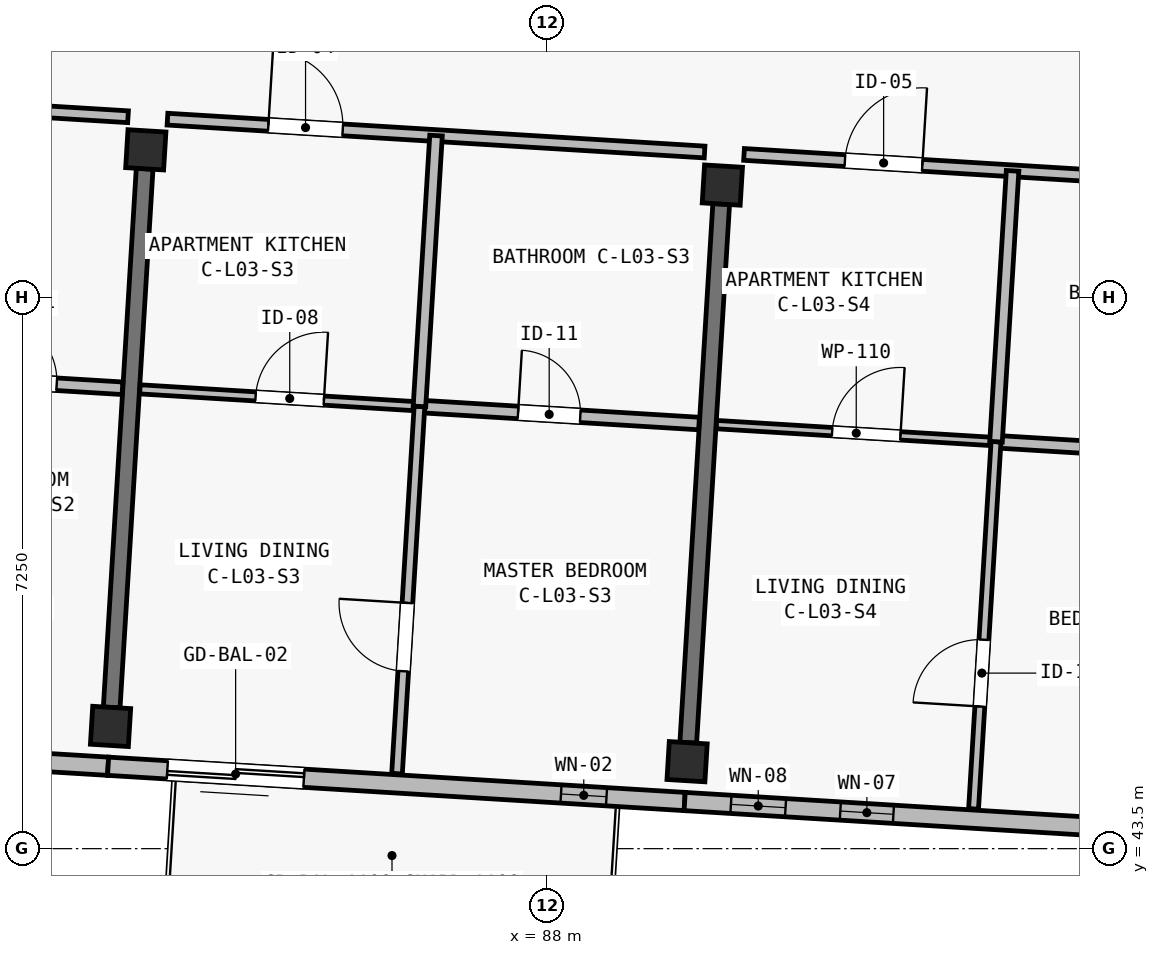
"""IFC4 building model, lengths in metres.
Left out: names, types, materials, properties, quantities, classifications, styles, units other than length and angle.
Written with IfcOpenShell. Run it as: python <this file> out.ifc"""

import sys

from ifc_helpers import new_model, si_unit, direction, frame, frame_2d, origin, origin_2d, place, context, subcontext, project, spatial, rectangle, extrude, element, fill, save


model = new_model("IFC4")
c1 = context("Model", 3, precision=1e-05, world=origin(), true_north=direction((0.0, 1.0)))
c2 = subcontext(c1, "Body", "Model", "MODEL_VIEW")
j1 = project(units=[si_unit("LENGTHUNIT", "METRE"), si_unit("PLANEANGLEUNIT", "RADIAN")], contexts=[c1])
p1 = place(None, origin())
s1 = spatial("IfcSite", under=j1, at=p1, CompositionType="ELEMENT")
p2 = place(p1, origin())
s2 = spatial("IfcBuilding", under=s1, at=p2, CompositionType="ELEMENT")
p3 = place(p2, frame((0.0, 0.0, 11.65)))
s3 = spatial("IfcBuildingStorey", under=s2, at=p3, CompositionType="ELEMENT", Elevation=11.65)
for number, where, z_axis, x_axis in (
    (1, (82.258, 45.108, 0.0), (0.0, 0.0, 1.0), (0.998, -0.061, 0.0)),
    (2, (82.721, 52.694, 0.0), (0.0, 0.0, 1.0), (0.998, -0.061, 0.0)),
    (3, (89.843, 44.644, 0.0), (0.0, 0.0, 1.0), (0.998, -0.061, 0.0)),
    (4, (90.307, 52.23, 0.0), (0.0, 0.0, 1.0), (0.998, -0.061, 0.0)),
):
    element("IfcColumn", number, at=place(p3, frame(where, z_axis=z_axis, x_axis=x_axis)), inside=s3, PredefinedType="COLUMN", context=c2, shape_type="SweptSolid", body=[
        extrude(rectangle(XDim=0.5, YDim=0.5, at=origin_2d()), origin(), (0.0, 0.0, 1.0), 3.25),
    ])
p4 = place(p3, frame((82.273, 45.358, 0.0), z_axis=(0.0, 0.0, 1.0), x_axis=(0.061070212127, 0.998133472633, 0.0)))
e5 = element("IfcWall", 5, at=p4, inside=s3, PredefinedType="SHEAR", context=c2, shape_type="SweptSolid", body=[
    extrude(rectangle(XDim=7.1, YDim=0.22, at=frame_2d((3.55, 0.0))), origin(), (0.0, 0.0, 1.0), 2.5),
])
p5 = place(p3, frame((89.859, 44.894, 0.0), z_axis=(0.0, 0.0, 1.0), x_axis=(0.061033859059, 0.99813569621, 0.0)))
e6 = element("IfcWall", 6, at=p5, inside=s3, PredefinedType="SHEAR", context=c2, shape_type="SweptSolid", body=[
    extrude(rectangle(XDim=7.1, YDim=0.22, at=frame_2d((3.55, 0.0))), origin(), (0.0, 0.0, 1.0), 2.5),
])
p6 = place(p3, frame((82.225, 44.584, 0.0), z_axis=(0.0, 0.0, 1.0), x_axis=(-0.998133591969, 0.061068261669, 0.0)))
e7 = element("IfcWall", 7, at=p6, inside=s3, PredefinedType="SOLIDWALL", context=c2, shape_type="SweptSolid", body=[
    extrude(rectangle(XDim=7.6, YDim=0.24, at=frame_2d((3.8, 0.0))), origin(), (0.0, 0.0, 1.0), 3.0),
])
p7 = place(p6, frame((0.845, 0.0, 0.52)))
e8 = element("IfcOpeningElement", 8, at=p7, cuts=e7, PredefinedType="OPENING", context=c2, shape_type="SweptSolid", body=[
    extrude(rectangle(XDim=0.74, YDim=2.26, at=frame_2d((0.37, 1.13))), frame((0.0, 0.135, 0.0), z_axis=(0.0, -1.0, 0.0), x_axis=(1.0, 0.0, 0.0)), (0.0, 0.0, 1.0), 0.27),
])
p8 = place(p6, frame((3.24, 0.0, 0.52)))
e9 = element("IfcOpeningElement", 9, at=p8, cuts=e7, PredefinedType="OPENING", context=c2, shape_type="SweptSolid", body=[
    extrude(rectangle(XDim=0.8, YDim=2.3, at=frame_2d((0.4, 1.15))), frame((0.0, 0.135, 0.0), z_axis=(0.0, -1.0, 0.0), x_axis=(1.0, 0.0, 0.0)), (0.0, 0.0, 1.0), 0.27),
])
p9 = place(p3, frame((89.811, 44.12, 0.0), z_axis=(0.0, 0.0, 1.0), x_axis=(-0.998135669243, 0.061034300063, 0.0)))
e10 = element("IfcWall", 10, at=p9, inside=s3, PredefinedType="SOLIDWALL", context=c2, shape_type="SweptSolid", body=[
    extrude(rectangle(XDim=7.6, YDim=0.24, at=frame_2d((3.8, 0.0))), origin(), (0.0, 0.0, 1.0), 3.0),
])
p10 = place(p9, frame((5.019, 0.0, 0.0)))
e11 = element("IfcOpeningElement", 11, at=p10, cuts=e10, PredefinedType="OPENING", context=c2, shape_type="SweptSolid", body=[
    extrude(rectangle(XDim=1.8, YDim=2.12, at=frame_2d((0.9, 1.06))), frame((0.0, 0.135, 0.0), z_axis=(0.0, -1.0, 0.0), x_axis=(1.0, 0.0, 0.0)), (0.0, 0.0, 1.0), 0.27),
])
p11 = place(p9, frame((1.03, 0.0, 0.42)))
e12 = element("IfcOpeningElement", 12, at=p11, cuts=e10, PredefinedType="OPENING", context=c2, shape_type="SweptSolid", body=[
    extrude(rectangle(XDim=0.6, YDim=2.22, at=frame_2d((0.3, 1.11))), frame((0.0, 0.135, 0.0), z_axis=(0.0, -1.0, 0.0), x_axis=(1.0, 0.0, 0.0)), (0.0, 0.0, 1.0), 0.27),
])
p12 = place(p3, frame((97.397, 43.656, 0.0), z_axis=(0.0, 0.0, 1.0), x_axis=(-0.998135549572, 0.061036257095, 0.0)))
e13 = element("IfcWall", 13, at=p12, inside=s3, PredefinedType="SOLIDWALL", context=c2, shape_type="SweptSolid", body=[
    extrude(rectangle(XDim=7.6, YDim=0.24, at=frame_2d((3.8, 0.0))), origin(), (0.0, 0.0, 1.0), 3.0),
])
p13 = place(p12, frame((1.231, 0.0, 0.48)))
e14 = element("IfcOpeningElement", 14, at=p13, cuts=e13, PredefinedType="OPENING", context=c2, shape_type="SweptSolid", body=[
    extrude(rectangle(XDim=0.64, YDim=2.18, at=frame_2d((0.32, 1.09))), frame((0.0, 0.135, 0.0), z_axis=(0.0, -1.0, 0.0), x_axis=(1.0, 0.0, 0.0)), (0.0, 0.0, 1.0), 0.27),
])
p14 = place(p12, frame((4.848, 0.0, 0.48)))
e15 = element("IfcOpeningElement", 15, at=p14, cuts=e13, PredefinedType="OPENING", context=c2, shape_type="SweptSolid", body=[
    extrude(rectangle(XDim=0.7, YDim=2.36, at=frame_2d((0.35, 1.18))), frame((0.0, 0.135, 0.0), z_axis=(0.0, -1.0, 0.0), x_axis=(1.0, 0.0, 0.0)), (0.0, 0.0, 1.0), 0.27),
])
p15 = place(p12, frame((6.27, 0.0, 0.52)))
e16 = element("IfcOpeningElement", 16, at=p15, cuts=e13, PredefinedType="OPENING", context=c2, shape_type="SweptSolid", body=[
    extrude(rectangle(XDim=0.72, YDim=2.16, at=frame_2d((0.36, 1.08))), frame((0.0, 0.135, 0.0), z_axis=(0.0, -1.0, 0.0), x_axis=(1.0, 0.0, 0.0)), (0.0, 0.0, 1.0), 0.27),
])
p16 = place(p3, frame((78.415, 53.378, 0.0), z_axis=(0.0, 0.0, 1.0), x_axis=(0.998131852862, -0.061096679962, 0.0)))
e17 = element("IfcWall", 17, at=p16, inside=s3, PredefinedType="PARTITIONING", context=c2, shape_type="SweptSolid", body=[
    extrude(rectangle(XDim=4.08, YDim=0.155, at=frame_2d((2.04, 0.0))), origin(), (0.0, 0.0, 1.0), 2.97),
])
p17 = place(p16, frame((0.457, 0.0, 0.0)))
e18 = element("IfcOpeningElement", 18, at=p17, cuts=e17, PredefinedType="OPENING", context=c2, shape_type="SweptSolid", body=[
    extrude(rectangle(XDim=1.02, YDim=2.2, at=frame_2d((0.51, 1.1))), frame((0.0, 0.093, 0.0), z_axis=(0.0, -1.0, 0.0), x_axis=(1.0, 0.0, 0.0)), (0.0, 0.0, 1.0), 0.185),
])
p18 = place(p3, frame((80.129, 49.697, 0.0), z_axis=(0.0, 0.0, 1.0), x_axis=(0.998138723231, -0.060984335579, 0.0)))
e19 = element("IfcWall", 19, at=p18, inside=s3, PredefinedType="PLUMBINGWALL", context=c2, shape_type="SweptSolid", body=[
    extrude(rectangle(XDim=2.29, YDim=0.165, at=frame_2d((1.145, 0.0))), origin(), (0.0, 0.0, 1.0), 2.97),
])
p19 = place(p18, frame((0.603, 0.0, 0.0)))
e20 = element("IfcOpeningElement", 20, at=p19, cuts=e19, PredefinedType="OPENING", context=c2, shape_type="SweptSolid", body=[
    extrude(rectangle(XDim=0.82, YDim=2.08, at=frame_2d((0.41, 1.04))), frame((0.0, 0.097, 0.0), z_axis=(0.0, -1.0, 0.0), x_axis=(1.0, 0.0, 0.0)), (0.0, 0.0, 1.0), 0.195),
])
p20 = place(p3, frame((83.007, 53.097, 0.0), z_axis=(0.0, 0.0, 1.0), x_axis=(0.998135666539, -0.061034344288, 0.0)))
e21 = element("IfcWall", 21, at=p20, inside=s3, PredefinedType="PARTITIONING", context=c2, shape_type="SweptSolid", body=[
    extrude(rectangle(XDim=7.08, YDim=0.155, at=frame_2d((3.54, 0.0))), origin(), (0.0, 0.0, 1.0), 2.97),
])
p21 = place(p20, frame((1.33, 0.0, 0.0)))
e22 = element("IfcOpeningElement", 22, at=p21, cuts=e21, PredefinedType="OPENING", context=c2, shape_type="SweptSolid", body=[
    extrude(rectangle(XDim=0.98, YDim=2.15, at=frame_2d((0.49, 1.075))), frame((0.0, 0.093, 0.0), z_axis=(0.0, -1.0, 0.0), x_axis=(1.0, 0.0, 0.0)), (0.0, 0.0, 1.0), 0.185),
])
p22 = place(p3, frame((82.644, 49.543, 0.0), z_axis=(0.0, 0.0, 1.0), x_axis=(0.998136472989, -0.061021154439, 0.0)))
e23 = element("IfcWall", 23, at=p22, inside=s3, PredefinedType="PARTITIONING", context=c2, shape_type="SweptSolid", body=[
    extrude(rectangle(XDim=3.685, YDim=0.12, at=frame_2d((1.842, 0.0))), origin(), (0.0, 0.0, 1.0), 2.97),
])
p23 = place(p22, frame((1.525, 0.0, 0.0)))
e24 = element("IfcOpeningElement", 24, at=p23, cuts=e23, PredefinedType="OPENING", context=c2, shape_type="SweptSolid", body=[
    extrude(rectangle(XDim=0.9, YDim=2.1, at=frame_2d((0.45, 1.05))), frame((0.0, 0.075, 0.0), z_axis=(0.0, -1.0, 0.0), x_axis=(1.0, 0.0, 0.0)), (0.0, 0.0, 1.0), 0.15),
])
p24 = place(p3, frame((86.322, 49.318, 0.0), z_axis=(0.0, 0.0, 1.0), x_axis=(0.998132682596, -0.061083123148, 0.0)))
e25 = element("IfcWall", 25, at=p24, inside=s3, PredefinedType="PLUMBINGWALL", context=c2, shape_type="SweptSolid", body=[
    extrude(rectangle(XDim=3.685, YDim=0.165, at=frame_2d((1.843, 0.0))), origin(), (0.0, 0.0, 1.0), 2.97),
])
p25 = place(p24, frame((1.3, 0.0, 0.0)))
e26 = element("IfcOpeningElement", 26, at=p25, cuts=e25, PredefinedType="OPENING", context=c2, shape_type="SweptSolid", body=[
    extrude(rectangle(XDim=0.82, YDim=2.08, at=frame_2d((0.41, 1.04))), frame((0.0, 0.097, 0.0), z_axis=(0.0, -1.0, 0.0), x_axis=(1.0, 0.0, 0.0)), (0.0, 0.0, 1.0), 0.195),
])
p26 = place(p3, frame((86.027, 44.487, 0.0), z_axis=(0.0, 0.0, 1.0), x_axis=(0.061034170677, 0.998135677155, 0.0)))
e27 = element("IfcWall", 27, at=p26, inside=s3, PredefinedType="PARTITIONING", context=c2, shape_type="SweptSolid", body=[
    extrude(rectangle(XDim=4.84, YDim=0.14, at=frame_2d((2.42, 0.0))), origin(), (0.0, 0.0, 1.0), 2.97),
])
p27 = place(p26, frame((1.35, 0.0, 0.0)))
e28 = element("IfcOpeningElement", 28, at=p27, cuts=e27, PredefinedType="OPENING", context=c2, shape_type="SweptSolid", body=[
    extrude(rectangle(XDim=0.9, YDim=2.1, at=frame_2d((0.45, 1.05))), frame((0.0, 0.085, 0.0), z_axis=(0.0, -1.0, 0.0), x_axis=(1.0, 0.0, 0.0)), (0.0, 0.0, 1.0), 0.17),
])
p28 = place(p3, frame((86.322, 49.318, 0.0), z_axis=(0.0, 0.0, 1.0), x_axis=(0.061071129902, 0.998133416479, 0.0)))
e29 = element("IfcWall", 29, at=p28, inside=s3, PredefinedType="PLUMBINGWALL", context=c2, shape_type="SweptSolid", body=[
    extrude(rectangle(XDim=3.57, YDim=0.165, at=frame_2d((1.785, 0.0))), origin(), (0.0, 0.0, 1.0), 2.97),
])
p29 = place(p3, frame((90.593, 52.633, 0.0), z_axis=(0.0, 0.0, 1.0), x_axis=(0.998135538078, -0.061036445065, 0.0)))
e30 = element("IfcWall", 30, at=p29, inside=s3, PredefinedType="PARTITIONING", context=c2, shape_type="SweptSolid", body=[
    extrude(rectangle(XDim=7.08, YDim=0.155, at=frame_2d((3.54, 0.0))), origin(), (0.0, 0.0, 1.0), 2.97),
])
p30 = place(p29, frame((1.33, 0.0, 0.0)))
e31 = element("IfcOpeningElement", 31, at=p30, cuts=e30, PredefinedType="OPENING", context=c2, shape_type="SweptSolid", body=[
    extrude(rectangle(XDim=1.02, YDim=2.2, at=frame_2d((0.51, 1.1))), frame((0.0, 0.093, 0.0), z_axis=(0.0, -1.0, 0.0), x_axis=(1.0, 0.0, 0.0)), (0.0, 0.0, 1.0), 0.185),
])
p31 = place(p3, frame((90.23, 49.079, 0.0), z_axis=(0.0, 0.0, 1.0), x_axis=(0.998132682596, -0.061083123148, 0.0)))
e32 = element("IfcWall", 32, at=p31, inside=s3, PredefinedType="PARTITIONING", context=c2, shape_type="SweptSolid", body=[
    extrude(rectangle(XDim=3.685, YDim=0.11, at=frame_2d((1.843, 0.0))), origin(), (0.0, 0.0, 1.0), 2.97),
])
p32 = place(p31, frame((1.525, 0.0, 0.0)))
e33 = element("IfcOpeningElement", 33, at=p32, cuts=e32, PredefinedType="OPENING", context=c2, shape_type="SweptSolid", body=[
    extrude(rectangle(XDim=0.9, YDim=2.1, at=frame_2d((0.45, 1.05))), frame((0.0, 0.07, 0.0), z_axis=(0.0, -1.0, 0.0), x_axis=(1.0, 0.0, 0.0)), (0.0, 0.0, 1.0), 0.14),
])
p33 = place(p3, frame((93.908, 48.854, 0.0), z_axis=(0.0, 0.0, 1.0), x_axis=(0.998136472989, -0.061021154439, 0.0)))
e34 = element("IfcWall", 34, at=p33, inside=s3, PredefinedType="PLUMBINGWALL", context=c2, shape_type="SweptSolid", body=[
    extrude(rectangle(XDim=3.685, YDim=0.165, at=frame_2d((1.842, 0.0))), origin(), (0.0, 0.0, 1.0), 2.97),
])
p34 = place(p33, frame((1.3, 0.0, 0.0)))
e35 = element("IfcOpeningElement", 35, at=p34, cuts=e34, PredefinedType="OPENING", context=c2, shape_type="SweptSolid", body=[
    extrude(rectangle(XDim=0.82, YDim=2.08, at=frame_2d((0.41, 1.04))), frame((0.0, 0.097, 0.0), z_axis=(0.0, -1.0, 0.0), x_axis=(1.0, 0.0, 0.0)), (0.0, 0.0, 1.0), 0.195),
])
p35 = place(p3, frame((93.612, 44.023, 0.0), z_axis=(0.0, 0.0, 1.0), x_axis=(0.061087499584, 0.99813241476, 0.0)))
e36 = element("IfcWall", 36, at=p35, inside=s3, PredefinedType="PARTITIONING", context=c2, shape_type="SweptSolid", body=[
    extrude(rectangle(XDim=4.84, YDim=0.13, at=frame_2d((2.42, 0.0))), origin(), (0.0, 0.0, 1.0), 2.97),
])
p36 = place(p35, frame((1.35, 0.0, 0.0)))
e37 = element("IfcOpeningElement", 37, at=p36, cuts=e36, PredefinedType="OPENING", context=c2, shape_type="SweptSolid", body=[
    extrude(rectangle(XDim=0.88, YDim=2.1, at=frame_2d((0.44, 1.05))), frame((0.0, 0.08, 0.0), z_axis=(0.0, -1.0, 0.0), x_axis=(1.0, 0.0, 0.0)), (0.0, 0.0, 1.0), 0.16),
])
p37 = place(p3, frame((93.908, 48.854, 0.0), z_axis=(0.0, 0.0, 1.0), x_axis=(0.060998831939, 0.998137837426, 0.0)))
e38 = element("IfcWall", 38, at=p37, inside=s3, PredefinedType="PLUMBINGWALL", context=c2, shape_type="SweptSolid", body=[
    extrude(rectangle(XDim=3.57, YDim=0.165, at=frame_2d((1.785, 0.0))), origin(), (0.0, 0.0, 1.0), 2.97),
])
p38 = place(p10, origin())
e39 = element("IfcDoor", 39, at=p38, inside=s3, OperationType="SLIDING_TO_LEFT", PredefinedType="DOOR", context=c2, shape_type="SweptSolid", body=[
    extrude(rectangle(XDim=1.8, YDim=2.12, at=frame_2d((0.9, 1.06))), frame((0.0, 0.025, 0.0), z_axis=(0.0, -1.0, 0.0), x_axis=(1.0, 0.0, 0.0)), (0.0, 0.0, 1.0), 0.05),
])
fill(e11, e39)
p39 = place(p11, origin())
e40 = element("IfcWindow", 40, at=p39, inside=s3, PartitioningType="SINGLE_PANEL", PredefinedType="WINDOW", context=c2, shape_type="SweptSolid", body=[
    extrude(rectangle(XDim=0.6, YDim=2.22, at=frame_2d((0.3, 1.11))), frame((0.0, 0.03, 0.0), z_axis=(0.0, -1.0, 0.0), x_axis=(1.0, 0.0, 0.0)), (0.0, 0.0, 1.0), 0.06),
])
fill(e12, e40)
p40 = place(p14, origin())
e41 = element("IfcWindow", 41, at=p40, inside=s3, PartitioningType="SINGLE_PANEL", PredefinedType="WINDOW", context=c2, shape_type="SweptSolid", body=[
    extrude(rectangle(XDim=0.7, YDim=2.36, at=frame_2d((0.35, 1.18))), frame((0.0, 0.03, 0.0), z_axis=(0.0, -1.0, 0.0), x_axis=(1.0, 0.0, 0.0)), (0.0, 0.0, 1.0), 0.06),
])
fill(e15, e41)
p41 = place(p15, origin())
e42 = element("IfcWindow", 42, at=p41, inside=s3, PartitioningType="SINGLE_PANEL", PredefinedType="WINDOW", context=c2, shape_type="SweptSolid", body=[
    extrude(rectangle(XDim=0.72, YDim=2.16, at=frame_2d((0.36, 1.08))), frame((0.0, 0.03, 0.0), z_axis=(0.0, -1.0, 0.0), x_axis=(1.0, 0.0, 0.0)), (0.0, 0.0, 1.0), 0.06),
])
fill(e16, e42)
p42 = place(p19, origin())
e43 = element("IfcDoor", 43, at=p42, inside=s3, OperationType="SINGLE_SWING_LEFT", PredefinedType="DOOR", context=c2, shape_type="SweptSolid", body=[
    extrude(rectangle(XDim=0.82, YDim=2.08, at=frame_2d((0.41, 1.04))), frame((0.0, 0.025, 0.0), z_axis=(0.0, -1.0, 0.0), x_axis=(1.0, 0.0, 0.0)), (0.0, 0.0, 1.0), 0.05),
])
fill(e20, e43)
p43 = place(p21, origin())
e44 = element("IfcDoor", 44, at=p43, inside=s3, OperationType="SINGLE_SWING_LEFT", PredefinedType="DOOR", context=c2, shape_type="SweptSolid", body=[
    extrude(rectangle(XDim=0.98, YDim=2.15, at=frame_2d((0.49, 1.075))), frame((0.0, 0.025, 0.0), z_axis=(0.0, -1.0, 0.0), x_axis=(1.0, 0.0, 0.0)), (0.0, 0.0, 1.0), 0.05),
])
fill(e22, e44)
p44 = place(p23, origin())
e45 = element("IfcDoor", 45, at=p44, inside=s3, OperationType="SINGLE_SWING_RIGHT", PredefinedType="DOOR", context=c2, shape_type="SweptSolid", body=[
    extrude(rectangle(XDim=0.9, YDim=2.1, at=frame_2d((0.45, 1.05))), frame((0.0, 0.025, 0.0), z_axis=(0.0, -1.0, 0.0), x_axis=(1.0, 0.0, 0.0)), (0.0, 0.0, 1.0), 0.05),
])
fill(e24, e45)
p45 = place(p25, origin())
e46 = element("IfcDoor", 46, at=p45, inside=s3, OperationType="SINGLE_SWING_LEFT", PredefinedType="DOOR", context=c2, shape_type="SweptSolid", body=[
    extrude(rectangle(XDim=0.82, YDim=2.08, at=frame_2d((0.41, 1.04))), frame((0.0, 0.025, 0.0), z_axis=(0.0, -1.0, 0.0), x_axis=(1.0, 0.0, 0.0)), (0.0, 0.0, 1.0), 0.05),
])
fill(e26, e46)
p46 = place(p27, origin())
e47 = element("IfcDoor", 47, at=p46, inside=s3, OperationType="SINGLE_SWING_RIGHT", PredefinedType="DOOR", context=c2, shape_type="SweptSolid", body=[
    extrude(rectangle(XDim=0.9, YDim=2.1, at=frame_2d((0.45, 1.05))), frame((0.0, 0.025, 0.0), z_axis=(0.0, -1.0, 0.0), x_axis=(1.0, 0.0, 0.0)), (0.0, 0.0, 1.0), 0.05),
])
fill(e28, e47)
p47 = place(p30, origin())
e48 = element("IfcDoor", 48, at=p47, inside=s3, OperationType="SINGLE_SWING_RIGHT", PredefinedType="DOOR", context=c2, shape_type="SweptSolid", body=[
    extrude(rectangle(XDim=1.02, YDim=2.2, at=frame_2d((0.51, 1.1))), frame((0.0, 0.025, 0.0), z_axis=(0.0, -1.0, 0.0), x_axis=(1.0, 0.0, 0.0)), (0.0, 0.0, 1.0), 0.05),
])
fill(e31, e48)
p48 = place(p32, origin())
e49 = element("IfcDoor", 49, at=p48, inside=s3, OperationType="SINGLE_SWING_RIGHT", PredefinedType="DOOR", context=c2, shape_type="SweptSolid", body=[
    extrude(rectangle(XDim=0.9, YDim=2.1, at=frame_2d((0.45, 1.05))), frame((0.0, 0.025, 0.0), z_axis=(0.0, -1.0, 0.0), x_axis=(1.0, 0.0, 0.0)), (0.0, 0.0, 1.0), 0.05),
])
fill(e33, e49)
p49 = place(p36, origin())
e50 = element("IfcDoor", 50, at=p49, inside=s3, OperationType="SINGLE_SWING_LEFT", PredefinedType="DOOR", context=c2, shape_type="SweptSolid", body=[
    extrude(rectangle(XDim=0.88, YDim=2.1, at=frame_2d((0.44, 1.05))), frame((0.0, 0.025, 0.0), z_axis=(0.0, -1.0, 0.0), x_axis=(1.0, 0.0, 0.0)), (0.0, 0.0, 1.0), 0.05),
])
fill(e37, e50)
save(model, sys.argv[1])
